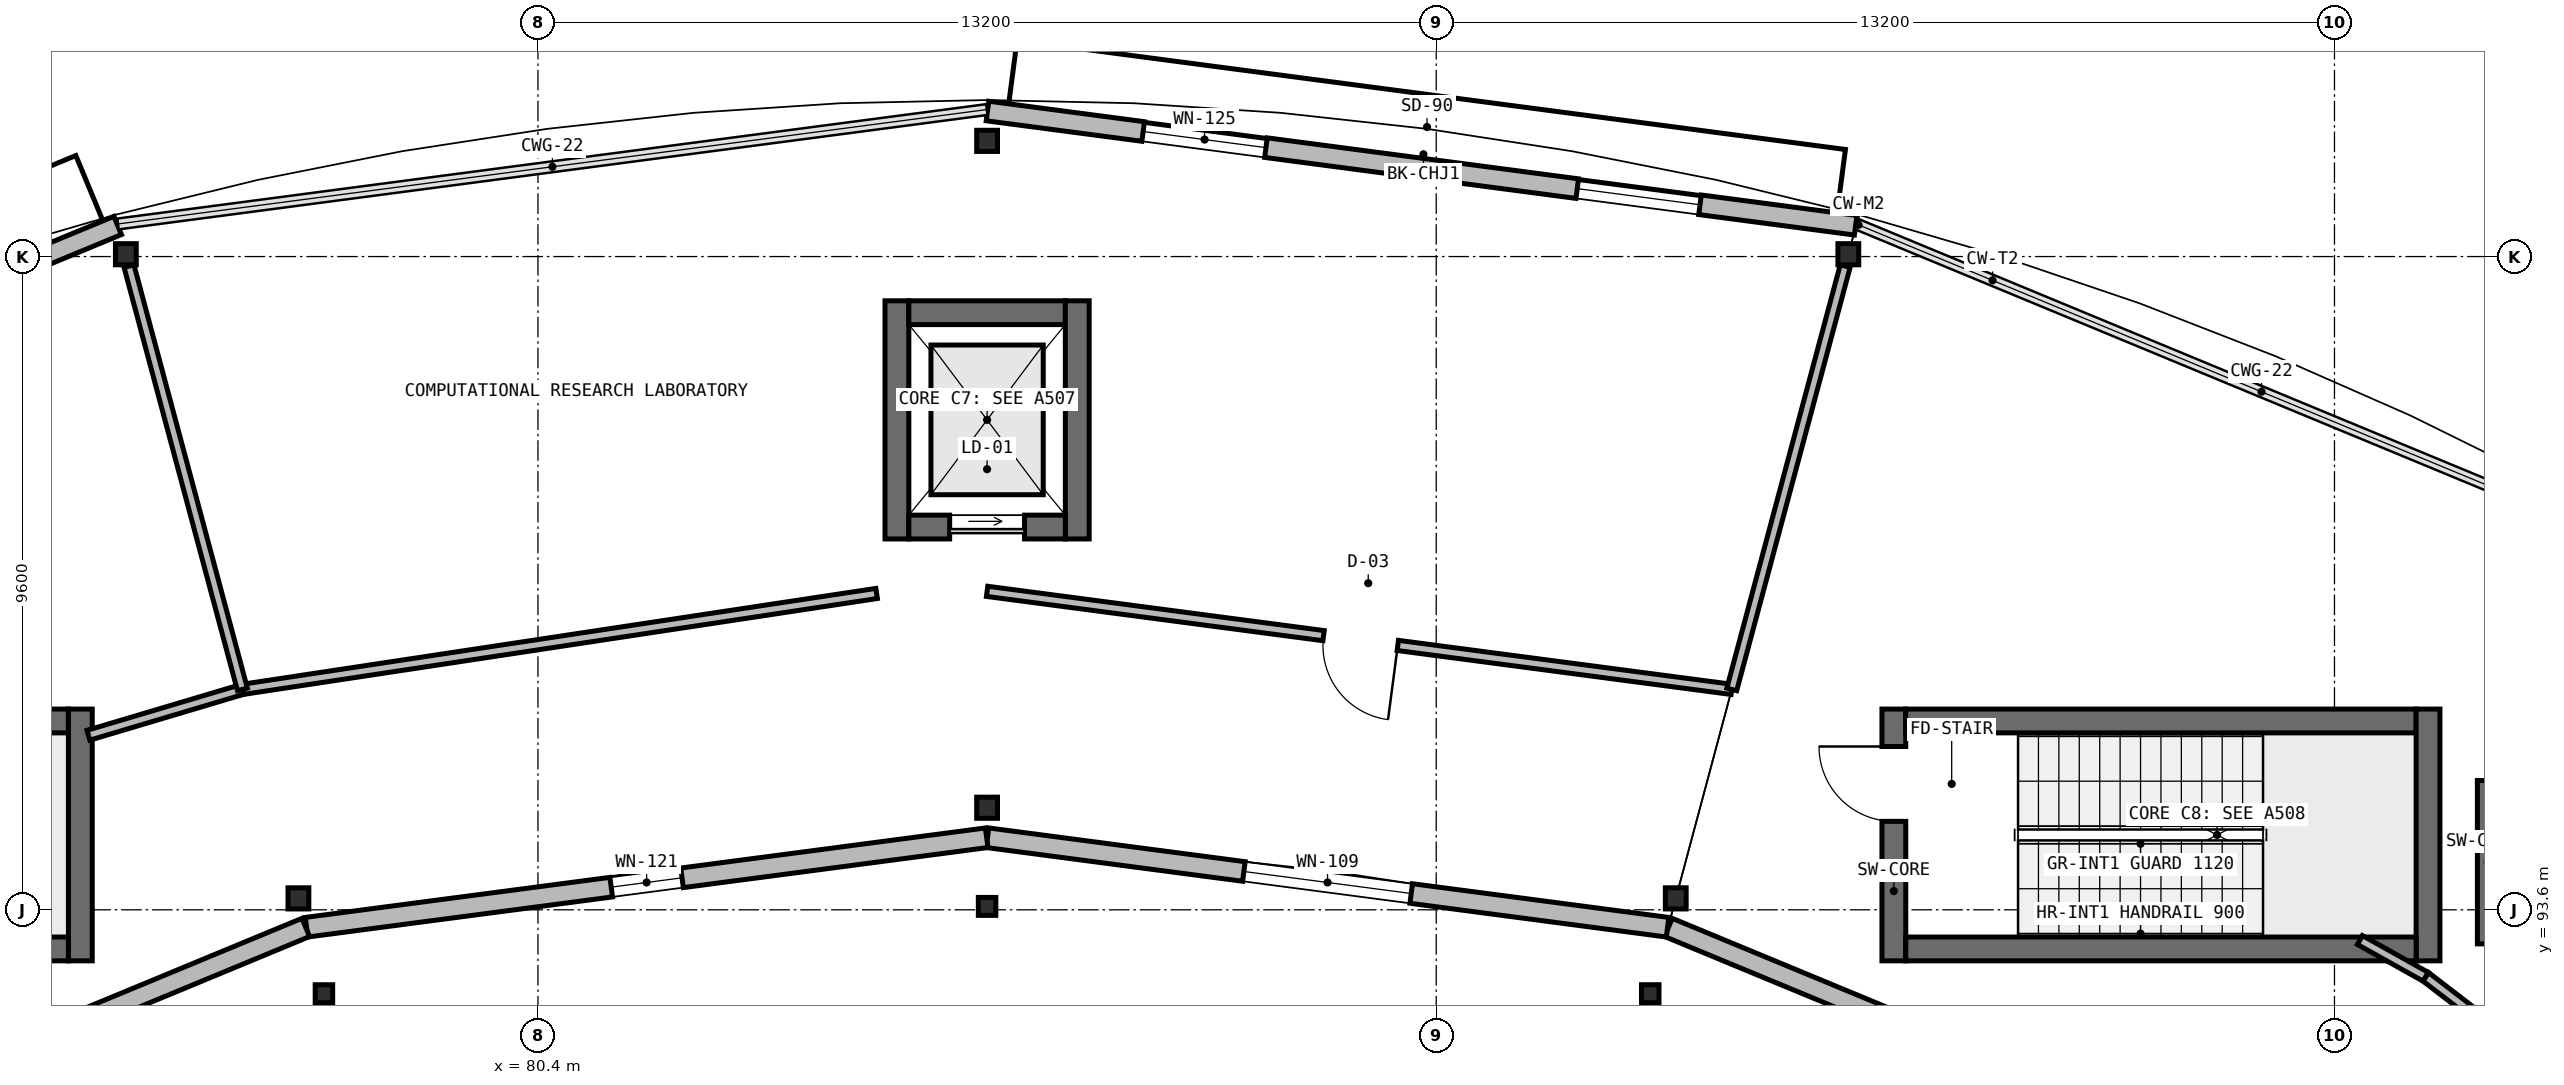
"""IFC4 building model, lengths in metres.
Left out: names, types, materials, properties, quantities, classifications, styles, units other than length and angle.
Written with IfcOpenShell. Run it as: python <this file> out.ifc"""

import sys

from ifc_helpers import new_model, si_unit, direction, frame, frame_2d, origin, origin_2d, place, context, subcontext, project, spatial, rectangle, i_section, extrude, element, fill, save


model = new_model("IFC4")
c1 = context("Model", 3, precision=1e-05, world=origin(), true_north=direction((0.0, 1.0)))
c2 = subcontext(c1, "Body", "Model", "MODEL_VIEW")
j1 = project(units=[si_unit("LENGTHUNIT", "METRE"), si_unit("PLANEANGLEUNIT", "RADIAN")], contexts=[c1])
p1 = place(None, origin())
s1 = spatial("IfcSite", under=j1, at=p1, CompositionType="ELEMENT")
p2 = place(p1, origin())
s2 = spatial("IfcBuilding", under=s1, at=p2, CompositionType="ELEMENT")
p3 = place(p2, frame((0.0, 0.0, 18.9)))
s3 = spatial("IfcBuildingStorey", under=s2, at=p3, CompositionType="ELEMENT", Elevation=18.9)
p4 = place(p3, frame((100.325, 92.85, 0.0), z_axis=(0.0, 0.0, 1.0), x_axis=(0.0, 1.0, 0.0)))
e1 = element("IfcWall", 1, at=p4, inside=s3, PredefinedType="SHEAR", context=c2, shape_type="SweptSolid", body=[
    extrude(rectangle(XDim=3.7, YDim=0.35, at=frame_2d((1.85, 0.0))), origin(), (0.0, 0.0, 1.0), 4.55),
])
p5 = place(p4, frame((2.05, 0.0, 0.0)))
e2 = element("IfcOpeningElement", 2, at=p5, cuts=e1, PredefinedType="OPENING", context=c2, shape_type="SweptSolid", body=[
    extrude(rectangle(XDim=1.1, YDim=2.15, at=frame_2d((0.55, 1.075))), frame((0.0, 0.185, 0.0), z_axis=(0.0, -1.0, 0.0), x_axis=(1.0, 0.0, 0.0)), (0.0, 0.0, 1.0), 0.37),
])
p6 = place(p3, frame((100.5, 96.375, 0.0), z_axis=(0.0, 0.0, 1.0), x_axis=(1.0, 0.0, 0.0)))
e3 = element("IfcWall", 3, at=p6, inside=s3, PredefinedType="SHEAR", context=c2, shape_type="SweptSolid", body=[
    extrude(rectangle(XDim=7.5, YDim=0.35, at=frame_2d((3.75, 0.0))), origin(), (0.0, 0.0, 1.0), 4.55),
])
p7 = place(p3, frame((108.175, 96.55, 0.0), z_axis=(0.0, 0.0, 1.0), x_axis=(0.0, -1.0, 0.0)))
e4 = element("IfcWall", 4, at=p7, inside=s3, PredefinedType="SHEAR", context=c2, shape_type="SweptSolid", body=[
    extrude(rectangle(XDim=3.7, YDim=0.35, at=frame_2d((1.85, 0.0))), origin(), (0.0, 0.0, 1.0), 4.55),
])
for number, where, z_axis, x_axis in (
    (5, (108.0, 93.025, 0.0), (0.0, 0.0, 1.0), (-1.0, 0.0, 0.0)),
    (6, (66.0, 96.375, 0.0), (0.0, 0.0, 1.0), (1.0, 0.0, 0.0)),
):
    element("IfcWall", number, at=place(p3, frame(where, z_axis=z_axis, x_axis=x_axis)), inside=s3, PredefinedType="SHEAR", context=c2, shape_type="SweptSolid", body=[
        extrude(rectangle(XDim=7.5, YDim=0.35, at=frame_2d((3.75, 0.0))), origin(), (0.0, 0.0, 1.0), 4.55),
    ])
p8 = place(p3, frame((73.675, 96.55, 0.0), z_axis=(0.0, 0.0, 1.0), x_axis=(0.0, -1.0, 0.0)))
e7 = element("IfcWall", 7, at=p8, inside=s3, PredefinedType="SHEAR", context=c2, shape_type="SweptSolid", body=[
    extrude(rectangle(XDim=3.7, YDim=0.35, at=frame_2d((1.85, 0.0))), origin(), (0.0, 0.0, 1.0), 4.55),
])
p9 = place(p3, frame((73.5, 93.025, 0.0), z_axis=(0.0, 0.0, 1.0), x_axis=(-1.0, 0.0, 0.0)))
e8 = element("IfcWall", 8, at=p9, inside=s3, PredefinedType="SHEAR", context=c2, shape_type="SweptSolid", body=[
    extrude(rectangle(XDim=7.5, YDim=0.35, at=frame_2d((3.75, 0.0))), origin(), (0.0, 0.0, 1.0), 4.55),
])
p10 = place(p9, frame((6.1, 0.0, 0.0)))
e9 = element("IfcOpeningElement", 9, at=p10, cuts=e8, PredefinedType="OPENING", context=c2, shape_type="SweptSolid", body=[
    extrude(rectangle(XDim=1.1, YDim=2.15, at=frame_2d((0.55, 1.075))), frame((0.0, 0.185, 0.0), z_axis=(0.0, -1.0, 0.0), x_axis=(1.0, 0.0, 0.0)), (0.0, 0.0, 1.0), 0.37),
])
p11 = place(p3, frame((85.675, 99.05, 0.0), z_axis=(0.0, 0.0, 1.0), x_axis=(0.0, 1.0, 0.0)))
e10 = element("IfcWall", 10, at=p11, inside=s3, PredefinedType="SHEAR", context=c2, shape_type="SweptSolid", body=[
    extrude(rectangle(XDim=3.5, YDim=0.35, at=frame_2d((1.75, 0.0))), origin(), (0.0, 0.0, 1.0), 4.55),
])
p12 = place(p3, frame((85.85, 102.375, 0.0), z_axis=(0.0, 0.0, 1.0), x_axis=(1.0, 0.0, 0.0)))
e11 = element("IfcWall", 11, at=p12, inside=s3, PredefinedType="SHEAR", context=c2, shape_type="SweptSolid", body=[
    extrude(rectangle(XDim=2.3, YDim=0.35, at=frame_2d((1.15, 0.0))), origin(), (0.0, 0.0, 1.0), 4.55),
])
p13 = place(p3, frame((88.325, 102.55, 0.0), z_axis=(0.0, 0.0, 1.0), x_axis=(0.0, -1.0, 0.0)))
e12 = element("IfcWall", 12, at=p13, inside=s3, PredefinedType="SHEAR", context=c2, shape_type="SweptSolid", body=[
    extrude(rectangle(XDim=3.5, YDim=0.35, at=frame_2d((1.75, 0.0))), origin(), (0.0, 0.0, 1.0), 4.55),
])
p14 = place(p3, frame((88.15, 99.225, 0.0), z_axis=(0.0, 0.0, 1.0), x_axis=(-1.0, 0.0, 0.0)))
e13 = element("IfcWall", 13, at=p14, inside=s3, PredefinedType="SHEAR", context=c2, shape_type="SweptSolid", body=[
    extrude(rectangle(XDim=2.3, YDim=0.35, at=frame_2d((1.15, 0.0))), origin(), (0.0, 0.0, 1.0), 4.55),
])
p15 = place(p14, frame((0.6, 0.0, 0.0)))
e14 = element("IfcOpeningElement", 14, at=p15, cuts=e13, PredefinedType="OPENING", context=c2, shape_type="SweptSolid", body=[
    extrude(rectangle(XDim=1.1, YDim=2.15, at=frame_2d((0.55, 1.075))), frame((0.0, 0.185, 0.0), z_axis=(0.0, -1.0, 0.0), x_axis=(1.0, 0.0, 0.0)), (0.0, 0.0, 1.0), 0.37),
])
for number, where, z_axis, x_axis in (
    (15, (97.12, 93.768, 0.0), (0.0, 0.0, 1.0), (1.0, 0.0, 0.0)),
    (16, (99.656, 103.234, 0.0), (0.0, 0.0, 1.0), (1.0, 0.0, 0.0)),
    (17, (87.0, 95.1, 0.0), (0.0, 0.0, 1.0), (1.0, 0.0, 0.0)),
    (18, (87.0, 104.9, 0.0), (0.0, 0.0, 1.0), (1.0, 0.0, 0.0)),
    (19, (76.88, 93.768, 0.0), (0.0, 0.0, 1.0), (1.0, 0.0, 0.0)),
    (20, (74.344, 103.234, 0.0), (0.0, 0.0, 1.0), (1.0, 0.0, 0.0)),
):
    element("IfcColumn", number, at=place(p3, frame(where, z_axis=z_axis, x_axis=x_axis)), inside=s3, PredefinedType="COLUMN", context=c2, shape_type="SweptSolid", body=[
        extrude(i_section(OverallWidth=0.306, OverallDepth=0.311, WebThickness=0.011, FlangeThickness=0.017, at=origin_2d()), origin(), (0.0, 0.0, 1.0), 4.55),
    ])
for number, where, z_axis, x_axis in (
    (21, (96.745, 92.367, 0.0), (0.0, 0.0, 1.0), (1.0, 0.0, 0.0)),
    (22, (87.0, 93.65, 0.0), (0.0, 0.0, 1.0), (1.0, 0.0, 0.0)),
    (23, (77.255, 92.367, 0.0), (0.0, 0.0, 1.0), (1.0, 0.0, 0.0)),
):
    element("IfcColumn", number, at=place(p3, frame(where, z_axis=z_axis, x_axis=x_axis)), inside=s3, PredefinedType="COLUMN", context=c2, shape_type="SweptSolid", body=[
        extrude(i_section(OverallWidth=0.257, OverallDepth=0.264, WebThickness=0.012, FlangeThickness=0.02, at=origin_2d()), origin(), (0.0, 0.0, 1.0), 5.25),
    ])
p16 = place(p3, frame((109.05, 93.1, 0.0), z_axis=(0.0, 0.0, 1.0), x_axis=(0.0, 1.0, 0.0)))
e24 = element("IfcWall", 24, at=p16, inside=s3, PredefinedType="SHEAR", context=c2, shape_type="SweptSolid", body=[
    extrude(rectangle(XDim=2.4, YDim=0.3, at=frame_2d((1.2, 0.0))), origin(), (0.0, 0.0, 1.0), 4.37),
])
p17 = place(p3, frame((106.325, 89.483, 0.0), z_axis=(0.0, 0.0, 1.0), x_axis=(-0.92385889973, 0.382733240508, 0.0)))
e25 = element("IfcWall", 25, at=p17, inside=s3, PredefinedType="SOLIDWALL", context=c2, shape_type="SweptSolid", body=[
    extrude(rectangle(XDim=10.081, YDim=0.29, at=frame_2d((5.04, 0.0))), origin(), (0.0, 0.0, 1.0), 4.31),
])
p18 = place(p17, frame((4.295, 0.0, 0.95)))
e26 = element("IfcOpeningElement", 26, at=p18, cuts=e25, PredefinedType="OPENING", context=c2, shape_type="SweptSolid", body=[
    extrude(rectangle(XDim=1.49, YDim=1.59, at=frame_2d((0.745, 0.795))), frame((0.0, 0.155, 0.0), z_axis=(0.0, -1.0, 0.0), x_axis=(1.0, 0.0, 0.0)), (0.0, 0.0, 1.0), 0.31),
])
p19 = place(p3, frame((87.006, 105.339, 0.0), z_axis=(0.0, 0.0, 1.0), x_axis=(0.991448870161, -0.130495738843, 0.0)))
e27 = element("IfcWall", 27, at=p19, inside=s3, PredefinedType="SOLIDWALL", context=c2, shape_type="SweptSolid", body=[
    extrude(rectangle(XDim=12.868, YDim=0.29, at=frame_2d((6.434, 0.0))), origin(), (0.0, 0.0, 1.0), 3.754),
])
p20 = place(p19, frame((2.307, 0.0, 0.95)))
e28 = element("IfcOpeningElement", 28, at=p20, cuts=e27, PredefinedType="OPENING", context=c2, shape_type="SweptSolid", body=[
    extrude(rectangle(XDim=1.82, YDim=1.81, at=frame_2d((0.91, 0.905))), frame((0.0, 0.155, 0.0), z_axis=(0.0, -1.0, 0.0), x_axis=(1.0, 0.0, 0.0)), (0.0, 0.0, 1.0), 0.31),
])
p21 = place(p19, frame((8.741, 0.0, 0.95)))
e29 = element("IfcOpeningElement", 29, at=p21, cuts=e27, PredefinedType="OPENING", context=c2, shape_type="SweptSolid", body=[
    extrude(rectangle(XDim=1.82, YDim=1.81, at=frame_2d((0.91, 0.905))), frame((0.0, 0.155, 0.0), z_axis=(0.0, -1.0, 0.0), x_axis=(1.0, 0.0, 0.0)), (0.0, 0.0, 1.0), 0.31),
])
p22 = place(p3, frame((97.0, 93.344, 0.0), z_axis=(0.0, 0.0, 1.0), x_axis=(-0.991454872597, 0.130450126879, 0.0)))
e30 = element("IfcWall", 30, at=p22, inside=s3, PredefinedType="SOLIDWALL", context=c2, shape_type="SweptSolid", body=[
    extrude(rectangle(XDim=10.08, YDim=0.29, at=frame_2d((5.04, 0.0))), origin(), (0.0, 0.0, 1.0), 3.672),
])
p23 = place(p22, frame((3.8, 0.0, 0.95)))
e31 = element("IfcOpeningElement", 31, at=p23, cuts=e30, PredefinedType="OPENING", context=c2, shape_type="SweptSolid", body=[
    extrude(rectangle(XDim=2.48, YDim=1.35, at=frame_2d((1.24, 0.675))), frame((0.0, 0.155, 0.0), z_axis=(0.0, -1.0, 0.0), x_axis=(1.0, 0.0, 0.0)), (0.0, 0.0, 1.0), 0.31),
])
p24 = place(p3, frame((86.994, 94.659, 0.0), z_axis=(0.0, 0.0, 1.0), x_axis=(-0.991454872597, -0.130450126879, 0.0)))
e32 = element("IfcWall", 32, at=p24, inside=s3, PredefinedType="SOLIDWALL", context=c2, shape_type="SweptSolid", body=[
    extrude(rectangle(XDim=10.08, YDim=0.29, at=frame_2d((5.04, 0.0))), origin(), (0.0, 0.0, 1.0), 3.672),
])
p25 = place(p24, frame((4.515, 0.0, 0.95)))
e33 = element("IfcOpeningElement", 33, at=p25, cuts=e32, PredefinedType="OPENING", context=c2, shape_type="SweptSolid", body=[
    extrude(rectangle(XDim=1.05, YDim=1.75, at=frame_2d((0.525, 0.875))), frame((0.0, 0.155, 0.0), z_axis=(0.0, -1.0, 0.0), x_axis=(1.0, 0.0, 0.0)), (0.0, 0.0, 1.0), 0.31),
])
p26 = place(p3, frame((62.335, 98.732, 0.0), z_axis=(0.0, 0.0, 1.0), x_axis=(0.923868612896, 0.382709793584, 0.0)))
e34 = element("IfcWall", 34, at=p26, inside=s3, PredefinedType="SOLIDWALL", context=c2, shape_type="SweptSolid", body=[
    extrude(rectangle(XDim=12.869, YDim=0.29, at=frame_2d((6.435, 0.0))), origin(), (0.0, 0.0, 1.0), 3.672),
])
p27 = place(p26, frame((2.527, 0.0, 0.95)))
e35 = element("IfcOpeningElement", 35, at=p27, cuts=e34, PredefinedType="OPENING", context=c2, shape_type="SweptSolid", body=[
    extrude(rectangle(XDim=1.38, YDim=1.97, at=frame_2d((0.69, 0.985))), frame((0.0, 0.155, 0.0), z_axis=(0.0, -1.0, 0.0), x_axis=(1.0, 0.0, 0.0)), (0.0, 0.0, 1.0), 0.31),
])
p28 = place(p26, frame((8.962, 0.0, 0.95)))
e36 = element("IfcOpeningElement", 36, at=p28, cuts=e34, PredefinedType="OPENING", context=c2, shape_type="SweptSolid", body=[
    extrude(rectangle(XDim=1.38, YDim=1.97, at=frame_2d((0.69, 0.985))), frame((0.0, 0.155, 0.0), z_axis=(0.0, -1.0, 0.0), x_axis=(1.0, 0.0, 0.0)), (0.0, 0.0, 1.0), 0.31),
])
p29 = place(p3, frame((76.988, 93.341, 0.0), z_axis=(0.0, 0.0, 1.0), x_axis=(-0.92385889973, -0.382733240508, 0.0)))
e37 = element("IfcWall", 37, at=p29, inside=s3, PredefinedType="SOLIDWALL", context=c2, shape_type="SweptSolid", body=[
    extrude(rectangle(XDim=10.081, YDim=0.29, at=frame_2d((5.04, 0.0))), origin(), (0.0, 0.0, 1.0), 4.31),
])
p30 = place(p29, frame((4.02, 0.0, 0.95)))
e38 = element("IfcOpeningElement", 38, at=p30, cuts=e37, PredefinedType="OPENING", context=c2, shape_type="SweptSolid", body=[
    extrude(rectangle(XDim=2.04, YDim=1.51, at=frame_2d((1.02, 0.755))), frame((0.0, 0.155, 0.0), z_axis=(0.0, -1.0, 0.0), x_axis=(1.0, 0.0, 0.0)), (0.0, 0.0, 1.0), 0.31),
])
p31 = place(p3, frame((116.896, 85.896, 0.0), z_axis=(0.0, 0.0, 1.0), x_axis=(-0.793301872689, 0.608828497024, 0.0)))
e39 = element("IfcWall", 39, at=p31, inside=s3, PredefinedType="PARTITIONING", context=c2, shape_type="SweptSolid", body=[
    extrude(rectangle(XDim=11.038, YDim=0.15, at=frame_2d((5.519, 0.0))), origin(), (0.0, 0.0, 1.0), 3.676),
])
p32 = place(p31, frame((4.95, 0.0, 0.0)))
e40 = element("IfcOpeningElement", 40, at=p32, cuts=e39, PredefinedType="OPENING", context=c2, shape_type="SweptSolid", body=[
    extrude(rectangle(XDim=1.1, YDim=2.2, at=frame_2d((0.55, 1.1))), frame((0.0, 0.085, 0.0), z_axis=(0.0, -1.0, 0.0), x_axis=(1.0, 0.0, 0.0)), (0.0, 0.0, 1.0), 0.17),
])
p33 = place(p3, frame((108.14, 92.616, 0.0), z_axis=(0.0, 0.0, 1.0), x_axis=(-0.872821867213, 0.488038920697, 0.0)))
e41 = element("IfcWall", 41, at=p33, inside=s3, PredefinedType="PARTITIONING", context=c2, shape_type="SweptSolid", body=[
    extrude(rectangle(XDim=1.106, YDim=0.15, at=frame_2d((0.553, 0.0))), origin(), (0.0, 0.0, 1.0), 4.3),
])
p34 = place(p3, frame((97.943, 96.839, 0.0), z_axis=(0.0, 0.0, 1.0), x_axis=(-0.991442170204, 0.130546632054, 0.0)))
e42 = element("IfcWall", 42, at=p34, inside=s3, PredefinedType="PARTITIONING", context=c2, shape_type="SweptSolid", body=[
    extrude(rectangle(XDim=11.038, YDim=0.15, at=frame_2d((5.519, 0.0))), origin(), (0.0, 0.0, 1.0), 3.676),
])
p35 = place(p34, frame((4.95, 0.0, 0.0)))
e43 = element("IfcOpeningElement", 43, at=p35, cuts=e42, PredefinedType="OPENING", context=c2, shape_type="SweptSolid", body=[
    extrude(rectangle(XDim=1.1, YDim=2.2, at=frame_2d((0.55, 1.1))), frame((0.0, 0.085, 0.0), z_axis=(0.0, -1.0, 0.0), x_axis=(1.0, 0.0, 0.0)), (0.0, 0.0, 1.0), 0.17),
])
p36 = place(p3, frame((85.377, 98.249, 0.0), z_axis=(0.0, 0.0, 1.0), x_axis=(-0.988750352389, -0.149575200656, 0.0)))
e44 = element("IfcWall", 44, at=p36, inside=s3, PredefinedType="PARTITIONING", context=c2, shape_type="SweptSolid", body=[
    extrude(rectangle(XDim=9.426, YDim=0.15, at=frame_2d((4.713, 0.0))), origin(), (0.0, 0.0, 1.0), 3.676),
])
p37 = place(p3, frame((76.057, 96.839, 0.0), z_axis=(0.0, 0.0, 1.0), x_axis=(-0.95838508169, -0.285478607244, 0.0)))
e45 = element("IfcWall", 45, at=p37, inside=s3, PredefinedType="PARTITIONING", context=c2, shape_type="SweptSolid", body=[
    extrude(rectangle(XDim=2.361, YDim=0.15, at=frame_2d((1.181, 0.0))), origin(), (0.0, 0.0, 1.0), 3.676),
])
for number, where, z_axis, x_axis in (
    (46, (97.943, 96.839, 0.0), (0.0, 0.0, 1.0), (0.259, 0.966, 0.0)),
    (47, (76.057, 96.839, 0.0), (0.0, 0.0, 1.0), (-0.259, 0.966, 0.0)),
):
    element("IfcWall", number, at=place(p3, frame(where, z_axis=z_axis, x_axis=x_axis)), inside=s3, PredefinedType="PARTITIONING", context=c2, shape_type="SweptSolid", body=[
        extrude(rectangle(XDim=6.44, YDim=0.15, at=frame_2d((3.22, 0.0))), origin(), (0.0, 0.0, 1.0), 3.676),
    ])
p38 = place(p20, origin())
e48 = element("IfcWindow", 48, at=p38, inside=s3, PartitioningType="SINGLE_PANEL", PredefinedType="WINDOW", context=c2, shape_type="SweptSolid", body=[
    extrude(rectangle(XDim=1.82, YDim=1.81, at=frame_2d((0.91, 0.905))), frame((0.0, 0.03, 0.0), z_axis=(0.0, -1.0, 0.0), x_axis=(1.0, 0.0, 0.0)), (0.0, 0.0, 1.0), 0.06),
])
fill(e28, e48)
p39 = place(p21, origin())
e49 = element("IfcWindow", 49, at=p39, inside=s3, PartitioningType="SINGLE_PANEL", PredefinedType="WINDOW", context=c2, shape_type="SweptSolid", body=[
    extrude(rectangle(XDim=1.82, YDim=1.81, at=frame_2d((0.91, 0.905))), frame((0.0, 0.03, 0.0), z_axis=(0.0, -1.0, 0.0), x_axis=(1.0, 0.0, 0.0)), (0.0, 0.0, 1.0), 0.06),
])
fill(e29, e49)
p40 = place(p23, origin())
e50 = element("IfcWindow", 50, at=p40, inside=s3, PartitioningType="SINGLE_PANEL", PredefinedType="WINDOW", context=c2, shape_type="SweptSolid", body=[
    extrude(rectangle(XDim=2.48, YDim=1.35, at=frame_2d((1.24, 0.675))), frame((0.0, 0.03, 0.0), z_axis=(0.0, -1.0, 0.0), x_axis=(1.0, 0.0, 0.0)), (0.0, 0.0, 1.0), 0.06),
])
fill(e31, e50)
p41 = place(p25, origin())
e51 = element("IfcWindow", 51, at=p41, inside=s3, PartitioningType="SINGLE_PANEL", PredefinedType="WINDOW", context=c2, shape_type="SweptSolid", body=[
    extrude(rectangle(XDim=1.05, YDim=1.75, at=frame_2d((0.525, 0.875))), frame((0.0, 0.03, 0.0), z_axis=(0.0, -1.0, 0.0), x_axis=(1.0, 0.0, 0.0)), (0.0, 0.0, 1.0), 0.06),
])
fill(e33, e51)
p42 = place(p5, origin())
e52 = element("IfcDoor", 52, at=p42, inside=s3, OperationType="SINGLE_SWING_RIGHT", PredefinedType="DOOR", context=c2, shape_type="SweptSolid", body=[
    extrude(rectangle(XDim=1.1, YDim=2.15, at=frame_2d((0.55, 1.075))), frame((0.0, 0.025, 0.0), z_axis=(0.0, -1.0, 0.0), x_axis=(1.0, 0.0, 0.0)), (0.0, 0.0, 1.0), 0.05),
])
fill(e2, e52)
p43 = place(p15, origin())
e53 = element("IfcDoor", 53, at=p43, inside=s3, OperationType="SLIDING_TO_LEFT", PredefinedType="USERDEFINED", context=c2, shape_type="SweptSolid", body=[
    extrude(rectangle(XDim=1.1, YDim=2.15, at=frame_2d((0.55, 1.075))), frame((0.0, 0.025, 0.0), z_axis=(0.0, -1.0, 0.0), x_axis=(1.0, 0.0, 0.0)), (0.0, 0.0, 1.0), 0.05),
])
fill(e14, e53)
p44 = place(p35, origin())
e54 = element("IfcDoor", 54, at=p44, inside=s3, OperationType="SINGLE_SWING_LEFT", PredefinedType="DOOR", context=c2, shape_type="SweptSolid", body=[
    extrude(rectangle(XDim=1.1, YDim=2.2, at=frame_2d((0.55, 1.1))), frame((0.0, 0.025, 0.0), z_axis=(0.0, -1.0, 0.0), x_axis=(1.0, 0.0, 0.0)), (0.0, 0.0, 1.0), 0.05),
])
fill(e43, e54)
save(model, sys.argv[1])
